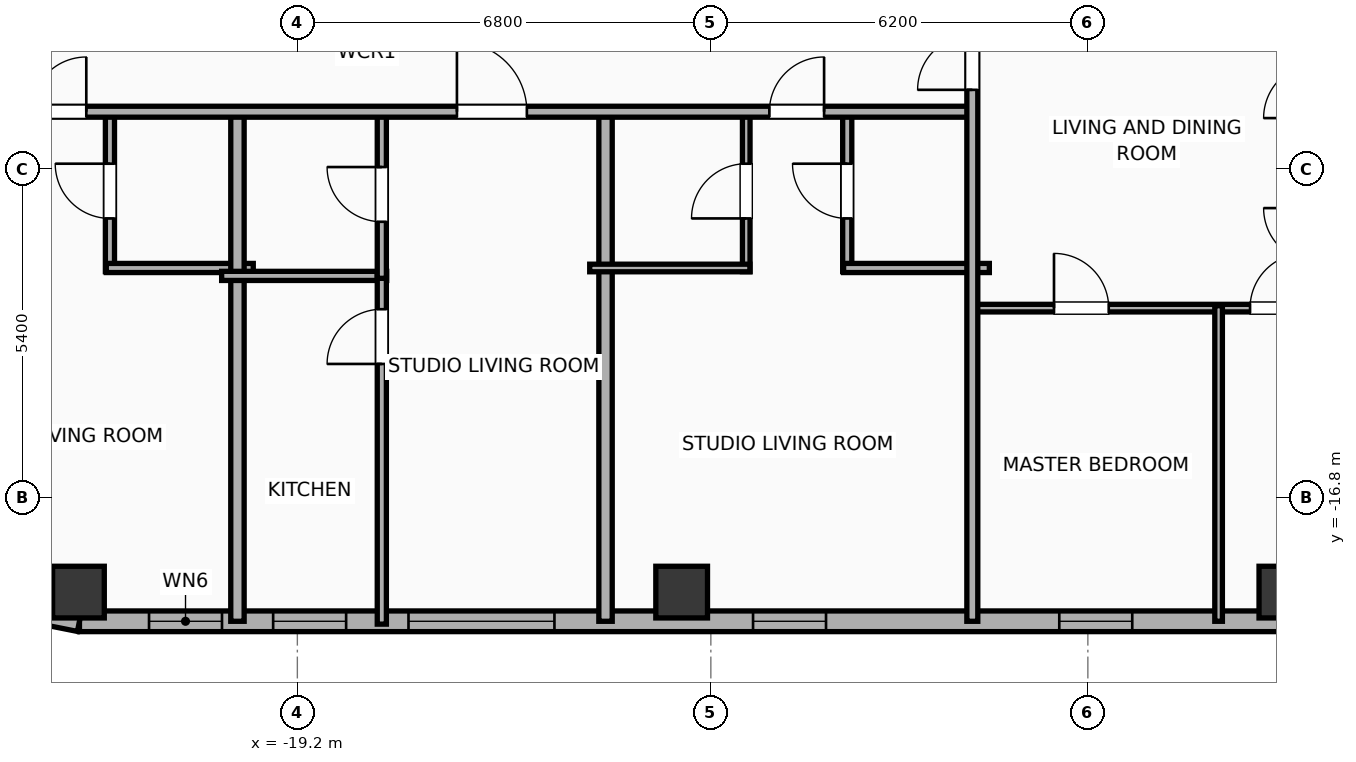
"""IFC4 building model, lengths in metres.
Left out: names, types, materials, properties, quantities, classifications, styles, units other than length and angle.
Written with IfcOpenShell. Run it as: python <this file> out.ifc"""

import sys

from ifc_helpers import new_model, si_unit, direction, frame, frame_2d, origin, origin_2d, place, context, subcontext, project, spatial, rectangle, hollow_rectangle, extrude, element, fill, save


model = new_model("IFC4")
c1 = context("Model", 3, precision=1e-05, world=origin(), true_north=direction((0.0, 1.0)))
c2 = subcontext(c1, "Body", "Model", "MODEL_VIEW")
j1 = project(units=[si_unit("LENGTHUNIT", "METRE"), si_unit("PLANEANGLEUNIT", "RADIAN")], contexts=[c1])
p1 = place(None, origin())
s1 = spatial("IfcSite", under=j1, at=p1, CompositionType="ELEMENT")
p2 = place(p1, origin())
s2 = spatial("IfcBuilding", under=s1, at=p2, CompositionType="ELEMENT")
p3 = place(p2, frame((0.0, 0.0, 250.9)))
s3 = spatial("IfcBuildingStorey", under=s2, at=p3, CompositionType="ELEMENT", Elevation=250.9)
for number, where, z_axis, x_axis in (
    (1, (-22.8, -18.35, 0.0), (0.0, 0.0, 1.0), (1.0, 0.0, 0.0)),
    (2, (-12.88, -18.35, 0.0), (0.0, 0.0, 1.0), (1.0, 0.0, 0.0)),
    (3, (-2.96, -18.35, 0.0), (0.0, 0.0, 1.0), (1.0, 0.0, 0.0)),
):
    element("IfcColumn", number, at=place(p3, frame(where, z_axis=z_axis, x_axis=x_axis)), inside=s3, PredefinedType="COLUMN", context=c2, shape_type="SweptSolid", body=[
        extrude(hollow_rectangle(XDim=0.85, YDim=0.85, WallThickness=0.028, at=origin_2d()), origin(), (0.0, 0.0, 1.0), 3.865),
    ])
p4 = place(p3, frame((26.783, -18.83, 0.0), z_axis=(0.0, 0.0, 1.0), x_axis=(-1.0, 0.0, 0.0)))
e4 = element("IfcWall", 4, at=p4, inside=s3, PredefinedType="ELEMENTEDWALL", context=c2, shape_type="SweptSolid", body=[
    extrude(rectangle(XDim=49.566, YDim=0.34, at=frame_2d((24.783, 0.0))), origin(), (0.0, 0.0, 1.0), 2.39),
])
p5 = place(p4, frame((23.583, 0.0, 0.75)))
e5 = element("IfcOpeningElement", 5, at=p5, cuts=e4, PredefinedType="OPENING", context=c2, shape_type="SweptSolid", body=[
    extrude(rectangle(XDim=2.4, YDim=1.45, at=frame_2d((1.2, 0.725))), frame((0.0, 0.18, 0.0), z_axis=(0.0, -1.0, 0.0), x_axis=(1.0, 0.0, 0.0)), (0.0, 0.0, 1.0), 0.36),
])
p6 = place(p4, frame((41.756, 0.0, 0.75)))
e6 = element("IfcOpeningElement", 6, at=p6, cuts=e4, PredefinedType="OPENING", context=c2, shape_type="SweptSolid", body=[
    extrude(rectangle(XDim=2.4, YDim=1.45, at=frame_2d((1.2, 0.725))), frame((0.0, 0.18, 0.0), z_axis=(0.0, -1.0, 0.0), x_axis=(1.0, 0.0, 0.0)), (0.0, 0.0, 1.0), 0.36),
])
p7 = place(p4, frame((47.222, 0.0, 0.55)))
e7 = element("IfcOpeningElement", 7, at=p7, cuts=e4, PredefinedType="OPENING", context=c2, shape_type="SweptSolid", body=[
    extrude(rectangle(XDim=1.2, YDim=1.15, at=frame_2d((0.6, 0.575))), frame((0.0, 0.18, 0.0), z_axis=(0.0, -1.0, 0.0), x_axis=(1.0, 0.0, 0.0)), (0.0, 0.0, 1.0), 0.36),
])
p8 = place(p4, frame((45.181, 0.0, 0.55)))
e8 = element("IfcOpeningElement", 8, at=p8, cuts=e4, PredefinedType="OPENING", context=c2, shape_type="SweptSolid", body=[
    extrude(rectangle(XDim=1.2, YDim=1.15, at=frame_2d((0.6, 0.575))), frame((0.0, 0.18, 0.0), z_axis=(0.0, -1.0, 0.0), x_axis=(1.0, 0.0, 0.0)), (0.0, 0.0, 1.0), 0.36),
])
p9 = place(p4, frame((37.289, 0.0, 0.55)))
e9 = element("IfcOpeningElement", 9, at=p9, cuts=e4, PredefinedType="OPENING", context=c2, shape_type="SweptSolid", body=[
    extrude(rectangle(XDim=1.2, YDim=1.15, at=frame_2d((0.6, 0.575))), frame((0.0, 0.18, 0.0), z_axis=(0.0, -1.0, 0.0), x_axis=(1.0, 0.0, 0.0)), (0.0, 0.0, 1.0), 0.36),
])
p10 = place(p4, frame((16.115, 0.0, 0.55)))
e10 = element("IfcOpeningElement", 10, at=p10, cuts=e4, PredefinedType="OPENING", context=c2, shape_type="SweptSolid", body=[
    extrude(rectangle(XDim=1.2, YDim=1.15, at=frame_2d((0.6, 0.575))), frame((0.0, 0.18, 0.0), z_axis=(0.0, -1.0, 0.0), x_axis=(1.0, 0.0, 0.0)), (0.0, 0.0, 1.0), 0.36),
])
p11 = place(p4, frame((12.422, 0.0, 0.55)))
e11 = element("IfcOpeningElement", 11, at=p11, cuts=e4, PredefinedType="OPENING", context=c2, shape_type="SweptSolid", body=[
    extrude(rectangle(XDim=1.2, YDim=1.15, at=frame_2d((0.6, 0.575))), frame((0.0, 0.18, 0.0), z_axis=(0.0, -1.0, 0.0), x_axis=(1.0, 0.0, 0.0)), (0.0, 0.0, 1.0), 0.36),
])
p12 = place(p4, frame((6.705, 0.0, 0.55)))
e12 = element("IfcOpeningElement", 12, at=p12, cuts=e4, PredefinedType="OPENING", context=c2, shape_type="SweptSolid", body=[
    extrude(rectangle(XDim=0.85, YDim=1.15, at=frame_2d((0.425, 0.575))), frame((0.0, 0.18, 0.0), z_axis=(0.0, -1.0, 0.0), x_axis=(1.0, 0.0, 0.0)), (0.0, 0.0, 1.0), 0.36),
])
p13 = place(p4, frame((4.637, 0.0, 0.55)))
e13 = element("IfcOpeningElement", 13, at=p13, cuts=e4, PredefinedType="OPENING", context=c2, shape_type="SweptSolid", body=[
    extrude(rectangle(XDim=1.2, YDim=1.15, at=frame_2d((0.6, 0.575))), frame((0.0, 0.18, 0.0), z_axis=(0.0, -1.0, 0.0), x_axis=(1.0, 0.0, 0.0)), (0.0, 0.0, 1.0), 0.36),
])
p14 = place(p4, frame((1.811, 0.0, 0.55)))
e14 = element("IfcOpeningElement", 14, at=p14, cuts=e4, PredefinedType="OPENING", context=c2, shape_type="SweptSolid", body=[
    extrude(rectangle(XDim=1.2, YDim=1.15, at=frame_2d((0.6, 0.575))), frame((0.0, 0.18, 0.0), z_axis=(0.0, -1.0, 0.0), x_axis=(1.0, 0.0, 0.0)), (0.0, 0.0, 1.0), 0.36),
])
p15 = place(p4, frame((32.253, 0.0, 0.55)))
e15 = element("IfcOpeningElement", 15, at=p15, cuts=e4, PredefinedType="OPENING", context=c2, shape_type="SweptSolid", body=[
    extrude(rectangle(XDim=1.2, YDim=1.15, at=frame_2d((0.6, 0.575))), frame((0.0, 0.18, 0.0), z_axis=(0.0, -1.0, 0.0), x_axis=(1.0, 0.0, 0.0)), (0.0, 0.0, 1.0), 0.36),
])
p16 = place(p4, frame((27.853, 0.0, 0.55)))
e16 = element("IfcOpeningElement", 16, at=p16, cuts=e4, PredefinedType="OPENING", context=c2, shape_type="SweptSolid", body=[
    extrude(rectangle(XDim=1.2, YDim=1.15, at=frame_2d((0.6, 0.575))), frame((0.0, 0.18, 0.0), z_axis=(0.0, -1.0, 0.0), x_axis=(1.0, 0.0, 0.0)), (0.0, 0.0, 1.0), 0.36),
])
p17 = place(p4, frame((20.473, 0.0, 0.55)))
e17 = element("IfcOpeningElement", 17, at=p17, cuts=e4, PredefinedType="OPENING", context=c2, shape_type="SweptSolid", body=[
    extrude(rectangle(XDim=1.2, YDim=1.15, at=frame_2d((0.6, 0.575))), frame((0.0, 0.18, 0.0), z_axis=(0.0, -1.0, 0.0), x_axis=(1.0, 0.0, 0.0)), (0.0, 0.0, 1.0), 0.36),
])
p18 = place(p3, frame((-22.783, -18.83, 0.0), z_axis=(0.0, 0.0, 1.0), x_axis=(-0.980788153188, 0.195075878998, 0.0)))
e18 = element("IfcWall", 18, at=p18, inside=s3, PredefinedType="ELEMENTEDWALL", context=c2, shape_type="SweptSolid", body=[
    extrude(rectangle(XDim=1.354, YDim=0.34, at=frame_2d((0.677, 0.0))), origin(), (0.0, 0.0, 1.0), 2.39),
])
p19 = place(p3, frame((-22.282, -13.08, 0.0), z_axis=(0.0, 0.0, 1.0), x_axis=(0.0, 1.0, 0.0)))
e19 = element("IfcWall", 19, at=p19, inside=s3, PredefinedType="PLUMBINGWALL", context=c2, shape_type="SweptSolid", body=[
    extrude(rectangle(XDim=2.65, YDim=0.15, at=frame_2d((1.325, 0.0))), origin(), (0.0, 0.0, 1.0), 3.5),
])
p20 = place(p19, frame((0.875, 0.0, 0.0)))
e20 = element("IfcOpeningElement", 20, at=p20, cuts=e19, PredefinedType="OPENING", context=c2, shape_type="SweptSolid", body=[
    extrude(rectangle(XDim=0.9, YDim=2.05, at=frame_2d((0.45, 1.025))), frame((0.0, 0.085, 0.0), z_axis=(0.0, -1.0, 0.0), x_axis=(1.0, 0.0, 0.0)), (0.0, 0.0, 1.0), 0.17),
])
p21 = place(p3, frame((-22.342, -13.02, 0.0), z_axis=(0.0, 0.0, 1.0), x_axis=(1.0, 0.0, 0.0)))
e21 = element("IfcWall", 21, at=p21, inside=s3, PredefinedType="PLUMBINGWALL", context=c2, shape_type="SweptSolid", body=[
    extrude(rectangle(XDim=2.417, YDim=0.15, at=frame_2d((1.208, 0.0))), origin(), (0.0, 0.0, 1.0), 3.5),
])
p22 = place(p3, frame((-20.185, -18.83, 0.0), z_axis=(0.0, 0.0, 1.0), x_axis=(0.0, 1.0, 0.0)))
e22 = element("IfcWall", 22, at=p22, inside=s3, PredefinedType="PARTITIONING", context=c2, shape_type="SweptSolid", body=[
    extrude(rectangle(XDim=8.46, YDim=0.22, at=frame_2d((4.23, 0.0))), origin(), (0.0, 0.0, 1.0), 2.39),
])
p23 = place(p3, frame((-20.445, -13.15, 0.0), z_axis=(0.0, 0.0, 1.0), x_axis=(1.0, 0.0, 0.0)))
e23 = element("IfcWall", 23, at=p23, inside=s3, PredefinedType="PLUMBINGWALL", context=c2, shape_type="SweptSolid", body=[
    extrude(rectangle(XDim=2.714, YDim=0.15, at=frame_2d((1.357, 0.0))), origin(), (0.0, 0.0, 1.0), 3.5),
])
p24 = place(p3, frame((-17.811, -18.877, 0.0), z_axis=(0.0, 0.0, 1.0), x_axis=(0.0, 1.0, 0.0)))
e24 = element("IfcWall", 24, at=p24, inside=s3, PredefinedType="PLUMBINGWALL", context=c2, shape_type="SweptSolid", body=[
    extrude(rectangle(XDim=5.767, YDim=0.15, at=frame_2d((2.883, 0.0))), origin(), (0.0, 0.0, 1.0), 2.39),
])
p25 = place(p24, frame((4.279, 0.0, 0.0)))
e25 = element("IfcOpeningElement", 25, at=p25, cuts=e24, PredefinedType="OPENING", context=c2, shape_type="SweptSolid", body=[
    extrude(rectangle(XDim=0.9, YDim=2.05, at=frame_2d((0.45, 1.025))), frame((0.0, 0.085, 0.0), z_axis=(0.0, -1.0, 0.0), x_axis=(1.0, 0.0, 0.0)), (0.0, 0.0, 1.0), 0.17),
])
p26 = place(p3, frame((-17.811, -13.19, 0.0), z_axis=(0.0, 0.0, 1.0), x_axis=(0.0, 1.0, 0.0)))
e26 = element("IfcWall", 26, at=p26, inside=s3, PredefinedType="PLUMBINGWALL", context=c2, shape_type="SweptSolid", body=[
    extrude(rectangle(XDim=2.76, YDim=0.15, at=frame_2d((1.38, 0.0))), origin(), (0.0, 0.0, 1.0), 3.5),
])
p27 = place(p26, frame((0.93, 0.0, 0.0)))
e27 = element("IfcOpeningElement", 27, at=p27, cuts=e26, PredefinedType="OPENING", context=c2, shape_type="SweptSolid", body=[
    extrude(rectangle(XDim=0.9, YDim=2.05, at=frame_2d((0.45, 1.025))), frame((0.0, 0.085, 0.0), z_axis=(0.0, -1.0, 0.0), x_axis=(1.0, 0.0, 0.0)), (0.0, 0.0, 1.0), 0.17),
])
p28 = place(p3, frame((-14.132, -18.83, 0.0), z_axis=(0.0, 0.0, 1.0), x_axis=(0.0, 1.0, 0.0)))
e28 = element("IfcWall", 28, at=p28, inside=s3, PredefinedType="PARTITIONING", context=c2, shape_type="SweptSolid", body=[
    extrude(rectangle(XDim=8.46, YDim=0.22, at=frame_2d((4.23, 0.0))), origin(), (0.0, 0.0, 1.0), 3.5),
])
p29 = place(p3, frame((-11.818, -13.08, 0.0), z_axis=(0.0, 0.0, 1.0), x_axis=(0.0, 1.0, 0.0)))
e29 = element("IfcWall", 29, at=p29, inside=s3, PredefinedType="PARTITIONING", context=c2, shape_type="SweptSolid", body=[
    extrude(rectangle(XDim=2.65, YDim=0.125, at=frame_2d((1.325, 0.0))), origin(), (0.0, 0.0, 1.0), 2.39),
])
p30 = place(p29, frame((0.875, 0.0, 0.0)))
e30 = element("IfcOpeningElement", 30, at=p30, cuts=e29, PredefinedType="OPENING", context=c2, shape_type="SweptSolid", body=[
    extrude(rectangle(XDim=0.9, YDim=2.05, at=frame_2d((0.45, 1.025))), frame((0.0, 0.073, 0.0), z_axis=(0.0, -1.0, 0.0), x_axis=(1.0, 0.0, 0.0)), (0.0, 0.0, 1.0), 0.145),
])
p31 = place(p3, frame((-10.157, -13.08, 0.0), z_axis=(0.0, 0.0, 1.0), x_axis=(0.0, 1.0, 0.0)))
e31 = element("IfcWall", 31, at=p31, inside=s3, PredefinedType="PLUMBINGWALL", context=c2, shape_type="SweptSolid", body=[
    extrude(rectangle(XDim=2.65, YDim=0.15, at=frame_2d((1.325, 0.0))), origin(), (0.0, 0.0, 1.0), 2.39),
])
p32 = place(p31, frame((0.875, 0.0, 0.0)))
e32 = element("IfcOpeningElement", 32, at=p32, cuts=e31, PredefinedType="OPENING", context=c2, shape_type="SweptSolid", body=[
    extrude(rectangle(XDim=0.9, YDim=2.05, at=frame_2d((0.45, 1.025))), frame((0.0, 0.085, 0.0), z_axis=(0.0, -1.0, 0.0), x_axis=(1.0, 0.0, 0.0)), (0.0, 0.0, 1.0), 0.17),
])
p33 = place(p3, frame((-14.392, -13.02, 0.0), z_axis=(0.0, 0.0, 1.0), x_axis=(1.0, 0.0, 0.0)))
e33 = element("IfcWall", 33, at=p33, inside=s3, PredefinedType="PARTITIONING", context=c2, shape_type="SweptSolid", body=[
    extrude(rectangle(XDim=2.634, YDim=0.125, at=frame_2d((1.317, 0.0))), origin(), (0.0, 0.0, 1.0), 3.5),
])
p34 = place(p3, frame((-10.217, -13.02, 0.0), z_axis=(0.0, 0.0, 1.0), x_axis=(1.0, 0.0, 0.0)))
e34 = element("IfcWall", 34, at=p34, inside=s3, PredefinedType="PLUMBINGWALL", context=c2, shape_type="SweptSolid", body=[
    extrude(rectangle(XDim=2.397, YDim=0.15, at=frame_2d((1.198, 0.0))), origin(), (0.0, 0.0, 1.0), 3.5),
])
p35 = place(p3, frame((-26.23, -10.45, 0.0), z_axis=(0.0, 0.0, 1.0), x_axis=(1.0, 0.0, 0.0)))
e35 = element("IfcWall", 35, at=p35, inside=s3, PredefinedType="PARTITIONING", context=c2, shape_type="SweptSolid", body=[
    extrude(rectangle(XDim=18.15, YDim=0.18, at=frame_2d((9.075, 0.0))), origin(), (0.0, 0.0, 1.0), 3.5),
])
p36 = place(p35, frame((2.659, 0.0, 0.0)))
e36 = element("IfcOpeningElement", 36, at=p36, cuts=e35, PredefinedType="OPENING", context=c2, shape_type="SweptSolid", body=[
    extrude(rectangle(XDim=0.9, YDim=2.05, at=frame_2d((0.45, 1.025))), frame((0.0, 0.1, 0.0), z_axis=(0.0, -1.0, 0.0), x_axis=(1.0, 0.0, 0.0)), (0.0, 0.0, 1.0), 0.2),
])
p37 = place(p35, frame((9.654, 0.0, 0.0)))
e37 = element("IfcOpeningElement", 37, at=p37, cuts=e35, PredefinedType="OPENING", context=c2, shape_type="SweptSolid", body=[
    extrude(rectangle(XDim=1.15, YDim=2.05, at=frame_2d((0.575, 1.025))), frame((0.0, 0.1, 0.0), z_axis=(0.0, -1.0, 0.0), x_axis=(1.0, 0.0, 0.0)), (0.0, 0.0, 1.0), 0.2),
])
p38 = place(p35, frame((14.792, 0.0, 0.0)))
e38 = element("IfcOpeningElement", 38, at=p38, cuts=e35, PredefinedType="OPENING", context=c2, shape_type="SweptSolid", body=[
    extrude(rectangle(XDim=0.9, YDim=2.05, at=frame_2d((0.45, 1.025))), frame((0.0, 0.1, 0.0), z_axis=(0.0, -1.0, 0.0), x_axis=(1.0, 0.0, 0.0)), (0.0, 0.0, 1.0), 0.2),
])
p39 = place(p3, frame((-8.08, -13.68, 0.0), z_axis=(0.0, 0.0, 1.0), x_axis=(1.0, 0.0, 0.0)))
e39 = element("IfcWall", 39, at=p39, inside=s3, PredefinedType="PARTITIONING", context=c2, shape_type="SweptSolid", body=[
    extrude(rectangle(XDim=8.06, YDim=0.125, at=frame_2d((4.03, 0.0))), origin(), (0.0, 0.0, 1.0), 3.5),
])
p40 = place(p39, frame((1.323, 0.0, 0.0)))
e40 = element("IfcOpeningElement", 40, at=p40, cuts=e39, PredefinedType="OPENING", context=c2, shape_type="SweptSolid", body=[
    extrude(rectangle(XDim=0.9, YDim=2.05, at=frame_2d((0.45, 1.025))), frame((0.0, 0.073, 0.0), z_axis=(0.0, -1.0, 0.0), x_axis=(1.0, 0.0, 0.0)), (0.0, 0.0, 1.0), 0.145),
])
p41 = place(p39, frame((4.547, 0.0, 0.0)))
e41 = element("IfcOpeningElement", 41, at=p41, cuts=e39, PredefinedType="OPENING", context=c2, shape_type="SweptSolid", body=[
    extrude(rectangle(XDim=0.9, YDim=2.05, at=frame_2d((0.45, 1.025))), frame((0.0, 0.073, 0.0), z_axis=(0.0, -1.0, 0.0), x_axis=(1.0, 0.0, 0.0)), (0.0, 0.0, 1.0), 0.145),
])
p42 = place(p3, frame((-4.05, -18.83, 0.0), z_axis=(0.0, 0.0, 1.0), x_axis=(0.0, 1.0, 0.0)))
e42 = element("IfcWall", 42, at=p42, inside=s3, PredefinedType="PARTITIONING", context=c2, shape_type="SweptSolid", body=[
    extrude(rectangle(XDim=5.19, YDim=0.125, at=frame_2d((2.595, 0.0))), origin(), (0.0, 0.0, 1.0), 2.39),
])
p43 = place(p3, frame((-8.1, -18.83, 0.0), z_axis=(0.0, 0.0, 1.0), x_axis=(0.0, 1.0, 0.0)))
e43 = element("IfcWall", 43, at=p43, inside=s3, PredefinedType="PARTITIONING", context=c2, shape_type="SweptSolid", body=[
    extrude(rectangle(XDim=9.99, YDim=0.18, at=frame_2d((4.995, 0.0))), origin(), (0.0, 0.0, 1.0), 3.5),
])
p44 = place(p43, frame((8.74, 0.0, 0.0)))
e44 = element("IfcOpeningElement", 44, at=p44, cuts=e43, PredefinedType="OPENING", context=c2, shape_type="SweptSolid", body=[
    extrude(rectangle(XDim=0.9, YDim=2.05, at=frame_2d((0.45, 1.025))), frame((0.0, 0.1, 0.0), z_axis=(0.0, -1.0, 0.0), x_axis=(1.0, 0.0, 0.0)), (0.0, 0.0, 1.0), 0.2),
])
p45 = place(p6, origin())
e45 = element("IfcWindow", 45, at=p45, inside=s3, PartitioningType="SINGLE_PANEL", PredefinedType="WINDOW", context=c2, shape_type="SweptSolid", body=[
    extrude(rectangle(XDim=2.4, YDim=1.45, at=frame_2d((1.2, 0.725))), frame((0.0, 0.03, 0.0), z_axis=(0.0, -1.0, 0.0), x_axis=(1.0, 0.0, 0.0)), (0.0, 0.0, 1.0), 0.06),
])
fill(e6, e45)
p46 = place(p7, origin())
e46 = element("IfcWindow", 46, at=p46, inside=s3, PartitioningType="SINGLE_PANEL", PredefinedType="WINDOW", context=c2, shape_type="SweptSolid", body=[
    extrude(rectangle(XDim=1.2, YDim=1.15, at=frame_2d((0.6, 0.575))), frame((0.0, 0.03, 0.0), z_axis=(0.0, -1.0, 0.0), x_axis=(1.0, 0.0, 0.0)), (0.0, 0.0, 1.0), 0.06),
])
fill(e7, e46)
p47 = place(p8, origin())
e47 = element("IfcWindow", 47, at=p47, inside=s3, PartitioningType="SINGLE_PANEL", PredefinedType="WINDOW", context=c2, shape_type="SweptSolid", body=[
    extrude(rectangle(XDim=1.2, YDim=1.15, at=frame_2d((0.6, 0.575))), frame((0.0, 0.03, 0.0), z_axis=(0.0, -1.0, 0.0), x_axis=(1.0, 0.0, 0.0)), (0.0, 0.0, 1.0), 0.06),
])
fill(e8, e47)
p48 = place(p9, origin())
e48 = element("IfcWindow", 48, at=p48, inside=s3, PartitioningType="SINGLE_PANEL", PredefinedType="WINDOW", context=c2, shape_type="SweptSolid", body=[
    extrude(rectangle(XDim=1.2, YDim=1.15, at=frame_2d((0.6, 0.575))), frame((0.0, 0.03, 0.0), z_axis=(0.0, -1.0, 0.0), x_axis=(1.0, 0.0, 0.0)), (0.0, 0.0, 1.0), 0.06),
])
fill(e9, e48)
p49 = place(p15, origin())
e49 = element("IfcWindow", 49, at=p49, inside=s3, PartitioningType="SINGLE_PANEL", PredefinedType="WINDOW", context=c2, shape_type="SweptSolid", body=[
    extrude(rectangle(XDim=1.2, YDim=1.15, at=frame_2d((0.6, 0.575))), frame((0.0, 0.03, 0.0), z_axis=(0.0, -1.0, 0.0), x_axis=(1.0, 0.0, 0.0)), (0.0, 0.0, 1.0), 0.06),
])
fill(e15, e49)
p50 = place(p20, origin())
e50 = element("IfcDoor", 50, at=p50, inside=s3, OperationType="SINGLE_SWING_RIGHT", PredefinedType="DOOR", context=c2, shape_type="SweptSolid", body=[
    extrude(rectangle(XDim=0.9, YDim=2.05, at=frame_2d((0.45, 1.025))), frame((0.0, 0.025, 0.0), z_axis=(0.0, -1.0, 0.0), x_axis=(1.0, 0.0, 0.0)), (0.0, 0.0, 1.0), 0.05),
])
fill(e20, e50)
p51 = place(p25, origin())
e51 = element("IfcDoor", 51, at=p51, inside=s3, OperationType="SINGLE_SWING_LEFT", PredefinedType="DOOR", context=c2, shape_type="SweptSolid", body=[
    extrude(rectangle(XDim=0.9, YDim=2.05, at=frame_2d((0.45, 1.025))), frame((0.0, 0.025, 0.0), z_axis=(0.0, -1.0, 0.0), x_axis=(1.0, 0.0, 0.0)), (0.0, 0.0, 1.0), 0.05),
])
fill(e25, e51)
p52 = place(p27, origin())
e52 = element("IfcDoor", 52, at=p52, inside=s3, OperationType="SINGLE_SWING_RIGHT", PredefinedType="DOOR", context=c2, shape_type="SweptSolid", body=[
    extrude(rectangle(XDim=0.9, YDim=2.05, at=frame_2d((0.45, 1.025))), frame((0.0, 0.025, 0.0), z_axis=(0.0, -1.0, 0.0), x_axis=(1.0, 0.0, 0.0)), (0.0, 0.0, 1.0), 0.05),
])
fill(e27, e52)
p53 = place(p30, origin())
e53 = element("IfcDoor", 53, at=p53, inside=s3, OperationType="SINGLE_SWING_LEFT", PredefinedType="DOOR", context=c2, shape_type="SweptSolid", body=[
    extrude(rectangle(XDim=0.9, YDim=2.05, at=frame_2d((0.45, 1.025))), frame((0.0, 0.025, 0.0), z_axis=(0.0, -1.0, 0.0), x_axis=(1.0, 0.0, 0.0)), (0.0, 0.0, 1.0), 0.05),
])
fill(e30, e53)
p54 = place(p32, origin())
e54 = element("IfcDoor", 54, at=p54, inside=s3, OperationType="SINGLE_SWING_RIGHT", PredefinedType="DOOR", context=c2, shape_type="SweptSolid", body=[
    extrude(rectangle(XDim=0.9, YDim=2.05, at=frame_2d((0.45, 1.025))), frame((0.0, 0.025, 0.0), z_axis=(0.0, -1.0, 0.0), x_axis=(1.0, 0.0, 0.0)), (0.0, 0.0, 1.0), 0.05),
])
fill(e32, e54)
p55 = place(p36, origin())
e55 = element("IfcDoor", 55, at=p55, inside=s3, OperationType="SINGLE_SWING_RIGHT", PredefinedType="DOOR", context=c2, shape_type="SweptSolid", body=[
    extrude(rectangle(XDim=0.9, YDim=2.05, at=frame_2d((0.45, 1.025))), frame((0.0, 0.025, 0.0), z_axis=(0.0, -1.0, 0.0), x_axis=(1.0, 0.0, 0.0)), (0.0, 0.0, 1.0), 0.05),
])
fill(e36, e55)
p56 = place(p37, origin())
e56 = element("IfcDoor", 56, at=p56, inside=s3, OperationType="SINGLE_SWING_LEFT", PredefinedType="DOOR", context=c2, shape_type="SweptSolid", body=[
    extrude(rectangle(XDim=1.15, YDim=2.05, at=frame_2d((0.575, 1.025))), frame((0.0, 0.025, 0.0), z_axis=(0.0, -1.0, 0.0), x_axis=(1.0, 0.0, 0.0)), (0.0, 0.0, 1.0), 0.05),
])
fill(e37, e56)
p57 = place(p38, origin())
e57 = element("IfcDoor", 57, at=p57, inside=s3, OperationType="SINGLE_SWING_RIGHT", PredefinedType="DOOR", context=c2, shape_type="SweptSolid", body=[
    extrude(rectangle(XDim=0.9, YDim=2.05, at=frame_2d((0.45, 1.025))), frame((0.0, 0.025, 0.0), z_axis=(0.0, -1.0, 0.0), x_axis=(1.0, 0.0, 0.0)), (0.0, 0.0, 1.0), 0.05),
])
fill(e38, e57)
p58 = place(p40, origin())
e58 = element("IfcDoor", 58, at=p58, inside=s3, OperationType="SINGLE_SWING_LEFT", PredefinedType="DOOR", context=c2, shape_type="SweptSolid", body=[
    extrude(rectangle(XDim=0.9, YDim=2.05, at=frame_2d((0.45, 1.025))), frame((0.0, 0.025, 0.0), z_axis=(0.0, -1.0, 0.0), x_axis=(1.0, 0.0, 0.0)), (0.0, 0.0, 1.0), 0.05),
])
fill(e40, e58)
p59 = place(p41, origin())
e59 = element("IfcDoor", 59, at=p59, inside=s3, OperationType="SINGLE_SWING_RIGHT", PredefinedType="DOOR", context=c2, shape_type="SweptSolid", body=[
    extrude(rectangle(XDim=0.9, YDim=2.05, at=frame_2d((0.45, 1.025))), frame((0.0, 0.025, 0.0), z_axis=(0.0, -1.0, 0.0), x_axis=(1.0, 0.0, 0.0)), (0.0, 0.0, 1.0), 0.05),
])
fill(e41, e59)
p60 = place(p44, origin())
e60 = element("IfcDoor", 60, at=p60, inside=s3, OperationType="SINGLE_SWING_LEFT", PredefinedType="DOOR", context=c2, shape_type="SweptSolid", body=[
    extrude(rectangle(XDim=0.9, YDim=2.05, at=frame_2d((0.45, 1.025))), frame((0.0, 0.025, 0.0), z_axis=(0.0, -1.0, 0.0), x_axis=(1.0, 0.0, 0.0)), (0.0, 0.0, 1.0), 0.05),
])
fill(e44, e60)
save(model, sys.argv[1])
